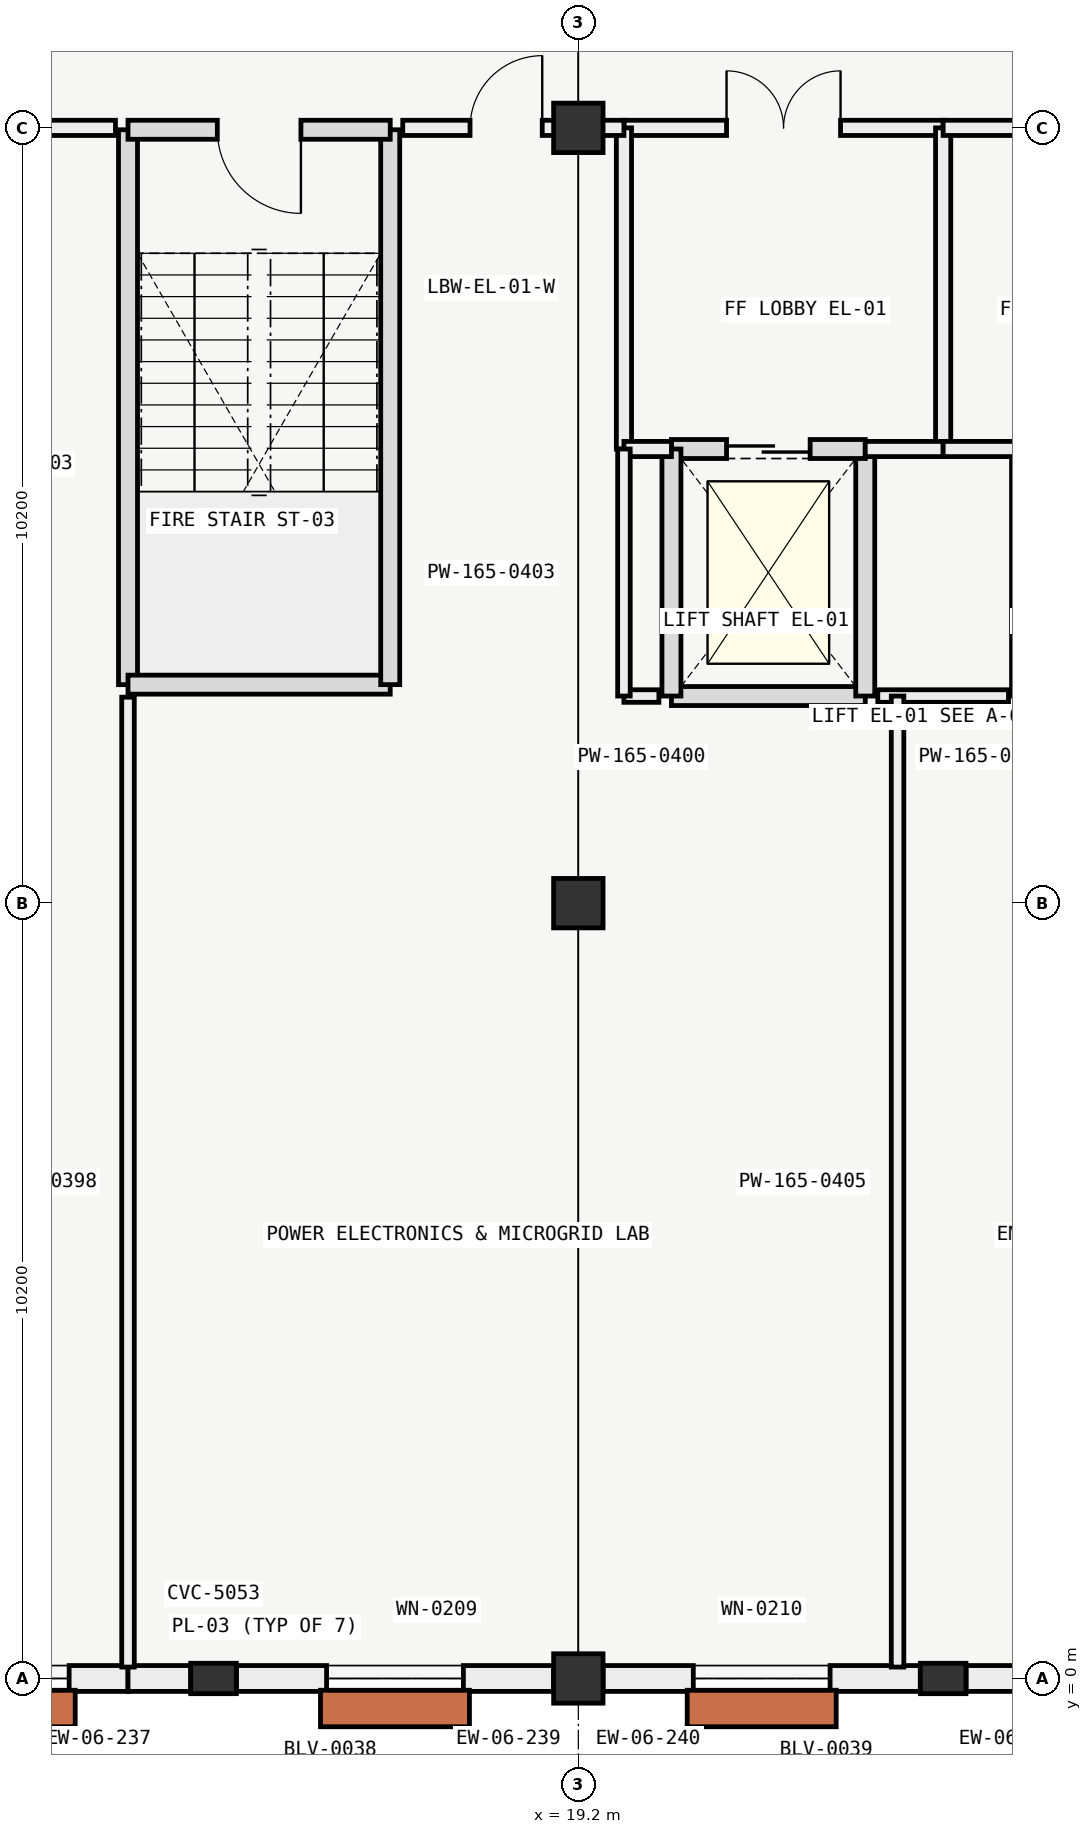
"""IFC4 building model, lengths in metres.
Left out: names, types, materials, properties, quantities, classifications, styles, units other than length and angle.
Written with IfcOpenShell. Run it as: python <this file> out.ifc"""

import sys

from ifc_helpers import new_model, si_unit, direction, frame, frame_2d, origin, origin_2d, place, context, subcontext, project, spatial, rectangle, extrude, element, fill, save


model = new_model("IFC4")
c1 = context("Model", 3, precision=1e-05, world=origin(), true_north=direction((0.0, 1.0)))
c2 = subcontext(c1, "Body", "Model", "MODEL_VIEW")
j1 = project(units=[si_unit("LENGTHUNIT", "METRE"), si_unit("PLANEANGLEUNIT", "RADIAN")], contexts=[c1])
p1 = place(None, origin())
s1 = spatial("IfcSite", under=j1, at=p1, CompositionType="ELEMENT")
p2 = place(p1, origin())
s2 = spatial("IfcBuilding", under=s1, at=p2, CompositionType="ELEMENT")
p3 = place(p2, frame((0.0, 0.0, 13.8)))
s3 = spatial("IfcBuildingStorey", under=s2, at=p3, CompositionType="ELEMENT", Elevation=13.8)
for number, where, z_axis, x_axis in (
    (1, (19.2, 0.0, 0.0), (0.0, 0.0, 1.0), (1.0, 0.0, 0.0)),
    (2, (19.2, 10.2, 0.0), (0.0, 0.0, 1.0), (1.0, 0.0, 0.0)),
    (3, (19.2, 20.4, 0.0), (0.0, 0.0, 1.0), (1.0, 0.0, 0.0)),
):
    element("IfcColumn", number, at=place(p3, frame(where, z_axis=z_axis, x_axis=x_axis)), inside=s3, PredefinedType="COLUMN", context=c2, shape_type="SweptSolid", body=[
        extrude(rectangle(XDim=0.65, YDim=0.65, at=origin_2d()), origin(), (0.0, 0.0, 1.0), 4.2),
    ])
for number, where, z_axis, x_axis in (
    (4, (14.4, 0.0, 0.0), (0.0, 0.0, 1.0), (0.0, 1.0, 0.0)),
    (5, (24.0, 0.0, 0.0), (0.0, 0.0, 1.0), (0.0, 1.0, 0.0)),
):
    element("IfcColumn", number, at=place(p3, frame(where, z_axis=z_axis, x_axis=x_axis)), inside=s3, PredefinedType="PILASTER", context=c2, shape_type="SweptSolid", body=[
        extrude(rectangle(XDim=0.4, YDim=0.6, at=origin_2d()), origin(), (0.0, 0.0, 1.0), 4.2),
    ])
p4 = place(p3, frame((13.275, 0.0, 0.0), z_axis=(0.0, 0.0, 1.0), x_axis=(-1.0, 0.0, 0.0)))
e6 = element("IfcWall", 6, at=p4, inside=s3, PredefinedType="SOLIDWALL", context=c2, shape_type="SweptSolid", body=[
    extrude(rectangle(XDim=3.349, YDim=0.34, at=frame_2d((1.674, 0.0))), origin(), (0.0, 0.0, 1.0), 3.28),
])
p5 = place(p4, frame((0.774, 0.0, 0.8)))
e7 = element("IfcOpeningElement", 7, at=p5, cuts=e6, PredefinedType="OPENING", context=c2, shape_type="SweptSolid", body=[
    extrude(rectangle(XDim=1.8, YDim=2.1, at=frame_2d((0.9, 1.05))), frame((0.0, 0.18, 0.0), z_axis=(0.0, -1.0, 0.0), x_axis=(1.0, 0.0, 0.0)), (0.0, 0.0, 1.0), 0.36),
])
p6 = place(p3, frame((14.099, 0.0, 0.0), z_axis=(0.0, 0.0, 1.0), x_axis=(-1.0, 0.0, 0.0)))
e8 = element("IfcWall", 8, at=p6, inside=s3, PredefinedType="SOLIDWALL", context=c2, shape_type="SweptSolid", body=[
    extrude(rectangle(XDim=0.824, YDim=0.34, at=frame_2d((0.412, 0.0))), origin(), (0.0, 0.0, 1.0), 3.28),
])
p7 = place(p3, frame((18.874, 0.0, 0.0), z_axis=(0.0, 0.0, 1.0), x_axis=(-1.0, 0.0, 0.0)))
e9 = element("IfcWall", 9, at=p7, inside=s3, PredefinedType="SOLIDWALL", context=c2, shape_type="SweptSolid", body=[
    extrude(rectangle(XDim=4.173, YDim=0.34, at=frame_2d((2.086, 0.0))), origin(), (0.0, 0.0, 1.0), 3.28),
])
p8 = place(p7, frame((1.187, 0.0, 0.8)))
e10 = element("IfcOpeningElement", 10, at=p8, cuts=e9, PredefinedType="OPENING", context=c2, shape_type="SweptSolid", body=[
    extrude(rectangle(XDim=1.8, YDim=2.1, at=frame_2d((0.9, 1.05))), frame((0.0, 0.18, 0.0), z_axis=(0.0, -1.0, 0.0), x_axis=(1.0, 0.0, 0.0)), (0.0, 0.0, 1.0), 0.36),
])
p9 = place(p3, frame((23.699, 0.0, 0.0), z_axis=(0.0, 0.0, 1.0), x_axis=(-1.0, 0.0, 0.0)))
e11 = element("IfcWall", 11, at=p9, inside=s3, PredefinedType="SOLIDWALL", context=c2, shape_type="SweptSolid", body=[
    extrude(rectangle(XDim=4.173, YDim=0.34, at=frame_2d((2.086, 0.0))), origin(), (0.0, 0.0, 1.0), 3.28),
])
p10 = place(p9, frame((1.187, 0.0, 0.8)))
e12 = element("IfcOpeningElement", 12, at=p10, cuts=e11, PredefinedType="OPENING", context=c2, shape_type="SweptSolid", body=[
    extrude(rectangle(XDim=1.8, YDim=2.1, at=frame_2d((0.9, 1.05))), frame((0.0, 0.18, 0.0), z_axis=(0.0, -1.0, 0.0), x_axis=(1.0, 0.0, 0.0)), (0.0, 0.0, 1.0), 0.36),
])
p11 = place(p3, frame((28.474, 0.0, 0.0), z_axis=(0.0, 0.0, 1.0), x_axis=(-1.0, 0.0, 0.0)))
e13 = element("IfcWall", 13, at=p11, inside=s3, PredefinedType="SOLIDWALL", context=c2, shape_type="SweptSolid", body=[
    extrude(rectangle(XDim=4.173, YDim=0.34, at=frame_2d((2.086, 0.0))), origin(), (0.0, 0.0, 1.0), 3.28),
])
p12 = place(p11, frame((1.187, 0.0, 0.8)))
e14 = element("IfcOpeningElement", 14, at=p12, cuts=e13, PredefinedType="OPENING", context=c2, shape_type="SweptSolid", body=[
    extrude(rectangle(XDim=1.8, YDim=2.1, at=frame_2d((0.9, 1.05))), frame((0.0, 0.18, 0.0), z_axis=(0.0, -1.0, 0.0), x_axis=(1.0, 0.0, 0.0)), (0.0, 0.0, 1.0), 0.36),
])
p13 = place(p3, frame((13.275, 20.375, 0.0), z_axis=(0.0, 0.0, 1.0), x_axis=(0.0, -1.0, 0.0)))
e15 = element("IfcWall", 15, at=p13, inside=s3, PredefinedType="SOLIDWALL", context=c2, shape_type="SweptSolid", body=[
    extrude(rectangle(XDim=7.3, YDim=0.25, at=frame_2d((3.65, 0.0))), origin(), (0.0, 0.0, 1.0), 3.95),
])
p14 = place(p3, frame((13.275, 13.075, 0.0), z_axis=(0.0, 0.0, 1.0), x_axis=(1.0, 0.0, 0.0)))
e16 = element("IfcWall", 16, at=p14, inside=s3, PredefinedType="SOLIDWALL", context=c2, shape_type="SweptSolid", body=[
    extrude(rectangle(XDim=3.45, YDim=0.25, at=frame_2d((1.725, 0.0))), origin(), (0.0, 0.0, 1.0), 3.95),
])
p15 = place(p3, frame((16.725, 13.075, 0.0), z_axis=(0.0, 0.0, 1.0), x_axis=(0.0, 1.0, 0.0)))
e17 = element("IfcWall", 17, at=p15, inside=s3, PredefinedType="SOLIDWALL", context=c2, shape_type="SweptSolid", body=[
    extrude(rectangle(XDim=7.3, YDim=0.25, at=frame_2d((3.65, 0.0))), origin(), (0.0, 0.0, 1.0), 3.95),
])
p16 = place(p3, frame((16.725, 20.375, 0.0), z_axis=(0.0, 0.0, 1.0), x_axis=(-1.0, 0.0, 0.0)))
e18 = element("IfcWall", 18, at=p16, inside=s3, PredefinedType="SOLIDWALL", context=c2, shape_type="SweptSolid", body=[
    extrude(rectangle(XDim=3.45, YDim=0.25, at=frame_2d((1.725, 0.0))), origin(), (0.0, 0.0, 1.0), 3.95),
])
p17 = place(p16, frame((1.175, 0.0, 0.0)))
e19 = element("IfcOpeningElement", 19, at=p17, cuts=e18, PredefinedType="OPENING", context=c2, shape_type="SweptSolid", body=[
    extrude(rectangle(XDim=1.1, YDim=2.2, at=frame_2d((0.55, 1.1))), frame((0.0, 0.135, 0.0), z_axis=(0.0, -1.0, 0.0), x_axis=(1.0, 0.0, 0.0)), (0.0, 0.0, 1.0), 0.27),
])
p18 = place(p3, frame((20.425, 12.925, 0.0), z_axis=(0.0, 0.0, 1.0), x_axis=(1.0, 0.0, 0.0)))
e20 = element("IfcWall", 20, at=p18, inside=s3, PredefinedType="SOLIDWALL", context=c2, shape_type="SweptSolid", body=[
    extrude(rectangle(XDim=2.55, YDim=0.25, at=frame_2d((1.275, 0.0))), origin(), (0.0, 0.0, 1.0), 3.95),
])
p19 = place(p3, frame((22.975, 12.925, 0.0), z_axis=(0.0, 0.0, 1.0), x_axis=(0.0, 1.0, 0.0)))
e21 = element("IfcWall", 21, at=p19, inside=s3, PredefinedType="SOLIDWALL", context=c2, shape_type="SweptSolid", body=[
    extrude(rectangle(XDim=3.25, YDim=0.25, at=frame_2d((1.625, 0.0))), origin(), (0.0, 0.0, 1.0), 3.95),
])
p20 = place(p3, frame((22.975, 16.175, 0.0), z_axis=(0.0, 0.0, 1.0), x_axis=(-1.0, 0.0, 0.0)))
e22 = element("IfcWall", 22, at=p20, inside=s3, PredefinedType="SOLIDWALL", context=c2, shape_type="SweptSolid", body=[
    extrude(rectangle(XDim=2.55, YDim=0.25, at=frame_2d((1.275, 0.0))), origin(), (0.0, 0.0, 1.0), 3.95),
])
p21 = place(p20, frame((0.725, 0.0, 0.0)))
e23 = element("IfcOpeningElement", 23, at=p21, cuts=e22, PredefinedType="OPENING", context=c2, shape_type="SweptSolid", body=[
    extrude(rectangle(XDim=1.1, YDim=2.1, at=frame_2d((0.55, 1.05))), frame((0.0, 0.135, 0.0), z_axis=(0.0, -1.0, 0.0), x_axis=(1.0, 0.0, 0.0)), (0.0, 0.0, 1.0), 0.27),
])
p22 = place(p3, frame((20.425, 16.175, 0.0), z_axis=(0.0, 0.0, 1.0), x_axis=(0.0, -1.0, 0.0)))
e24 = element("IfcWall", 24, at=p22, inside=s3, PredefinedType="SOLIDWALL", context=c2, shape_type="SweptSolid", body=[
    extrude(rectangle(XDim=3.25, YDim=0.25, at=frame_2d((1.625, 0.0))), origin(), (0.0, 0.0, 1.0), 3.95),
])
p23 = place(p3, frame((19.8, 20.4, 0.0), z_axis=(0.0, 0.0, 1.0), x_axis=(1.0, 0.0, 0.0)))
e25 = element("IfcWall", 25, at=p23, inside=s3, PredefinedType="PARTITIONING", context=c2, shape_type="SweptSolid", body=[
    extrude(rectangle(XDim=4.2, YDim=0.2, at=frame_2d((2.1, 0.0))), origin(), (0.0, 0.0, 1.0), 3.33),
])
p24 = place(p23, frame((1.35, 0.0, 0.0)))
e26 = element("IfcOpeningElement", 26, at=p24, cuts=e25, PredefinedType="OPENING", context=c2, shape_type="SweptSolid", body=[
    extrude(rectangle(XDim=1.5, YDim=2.2, at=frame_2d((0.75, 1.1))), frame((0.0, 0.11, 0.0), z_axis=(0.0, -1.0, 0.0), x_axis=(1.0, 0.0, 0.0)), (0.0, 0.0, 1.0), 0.22),
])
for number, where, z_axis, x_axis in (
    (27, (19.8, 16.175, 0.0), (0.0, 0.0, 1.0), (0.0, 1.0, 0.0)),
    (28, (24.0, 16.175, 0.0), (0.0, 0.0, 1.0), (0.0, 1.0, 0.0)),
):
    element("IfcWall", number, at=place(p3, frame(where, z_axis=z_axis, x_axis=x_axis)), inside=s3, PredefinedType="PARTITIONING", context=c2, shape_type="SweptSolid", body=[
        extrude(rectangle(XDim=4.225, YDim=0.2, at=frame_2d((2.112, 0.0))), origin(), (0.0, 0.0, 1.0), 3.33),
    ])
p25 = place(p3, frame((19.8, 16.175, 0.0), z_axis=(0.0, 0.0, 1.0), x_axis=(1.0, 0.0, 0.0)))
e29 = element("IfcWall", 29, at=p25, inside=s3, PredefinedType="PARTITIONING", context=c2, shape_type="SweptSolid", body=[
    extrude(rectangle(XDim=0.625, YDim=0.2, at=frame_2d((0.312, 0.0))), origin(), (0.0, 0.0, 1.0), 3.55),
])
p26 = place(p3, frame((22.975, 16.175, 0.0), z_axis=(0.0, 0.0, 1.0), x_axis=(1.0, 0.0, 0.0)))
e30 = element("IfcWall", 30, at=p26, inside=s3, PredefinedType="PARTITIONING", context=c2, shape_type="SweptSolid", body=[
    extrude(rectangle(XDim=1.025, YDim=0.2, at=frame_2d((0.512, 0.0))), origin(), (0.0, 0.0, 1.0), 3.55),
])
p27 = place(p3, frame((24.0, 20.4, 0.0), z_axis=(0.0, 0.0, 1.0), x_axis=(1.0, 0.0, 0.0)))
e31 = element("IfcWall", 31, at=p27, inside=s3, PredefinedType="PARTITIONING", context=c2, shape_type="SweptSolid", body=[
    extrude(rectangle(XDim=4.2, YDim=0.2, at=frame_2d((2.1, 0.0))), origin(), (0.0, 0.0, 1.0), 3.33),
])
p28 = place(p27, frame((1.35, 0.0, 0.0)))
e32 = element("IfcOpeningElement", 32, at=p28, cuts=e31, PredefinedType="OPENING", context=c2, shape_type="SweptSolid", body=[
    extrude(rectangle(XDim=1.5, YDim=2.2, at=frame_2d((0.75, 1.1))), frame((0.0, 0.11, 0.0), z_axis=(0.0, -1.0, 0.0), x_axis=(1.0, 0.0, 0.0)), (0.0, 0.0, 1.0), 0.22),
])
p29 = place(p3, frame((24.0, 16.175, 0.0), z_axis=(0.0, 0.0, 1.0), x_axis=(1.0, 0.0, 0.0)))
e33 = element("IfcWall", 33, at=p29, inside=s3, PredefinedType="PARTITIONING", context=c2, shape_type="SweptSolid", body=[
    extrude(rectangle(XDim=1.025, YDim=0.2, at=frame_2d((0.512, 0.0))), origin(), (0.0, 0.0, 1.0), 3.55),
])
p30 = place(p3, frame((13.275, 0.15, 0.0), z_axis=(0.0, 0.0, 1.0), x_axis=(0.0, 1.0, 0.0)))
e34 = element("IfcWall", 34, at=p30, inside=s3, PredefinedType="PARTITIONING", context=c2, shape_type="SweptSolid", body=[
    extrude(rectangle(XDim=12.76, YDim=0.165, at=frame_2d((6.38, 0.0))), origin(), (0.0, 0.0, 1.0), 3.33),
])
p31 = place(p3, frame((0.15, 20.4, 0.0), z_axis=(0.0, 0.0, 1.0), x_axis=(1.0, 0.0, 0.0)))
e35 = element("IfcWall", 35, at=p31, inside=s3, PredefinedType="PARTITIONING", context=c2, shape_type="SweptSolid", body=[
    extrude(rectangle(XDim=12.96, YDim=0.2, at=frame_2d((6.48, 0.0))), origin(), (0.0, 0.0, 1.0), 3.28),
])
p32 = place(p31, frame((6.05, 0.0, 0.0)))
e36 = element("IfcOpeningElement", 36, at=p32, cuts=e35, PredefinedType="OPENING", context=c2, shape_type="SweptSolid", body=[
    extrude(rectangle(XDim=1.4, YDim=2.2, at=frame_2d((0.7, 1.1))), frame((0.0, 0.11, 0.0), z_axis=(0.0, -1.0, 0.0), x_axis=(1.0, 0.0, 0.0)), (0.0, 0.0, 1.0), 0.22),
])
p33 = place(p3, frame((19.8, 12.925, 0.0), z_axis=(0.0, 0.0, 1.0), x_axis=(1.0, 0.0, 0.0)))
e37 = element("IfcWall", 37, at=p33, inside=s3, PredefinedType="PARTITIONING", context=c2, shape_type="SweptSolid", body=[
    extrude(rectangle(XDim=0.46, YDim=0.165, at=frame_2d((0.23, 0.0))), origin(), (0.0, 0.0, 1.0), 3.85),
])
p34 = place(p3, frame((23.14, 12.925, 0.0), z_axis=(0.0, 0.0, 1.0), x_axis=(1.0, 0.0, 0.0)))
e38 = element("IfcWall", 38, at=p34, inside=s3, PredefinedType="PARTITIONING", context=c2, shape_type="SweptSolid", body=[
    extrude(rectangle(XDim=1.72, YDim=0.165, at=frame_2d((0.86, 0.0))), origin(), (0.0, 0.0, 1.0), 3.85),
])
p35 = place(p3, frame((19.8, 12.925, 0.0), z_axis=(0.0, 0.0, 1.0), x_axis=(0.0, 1.0, 0.0)))
e39 = element("IfcWall", 39, at=p35, inside=s3, PredefinedType="PARTITIONING", context=c2, shape_type="SweptSolid", body=[
    extrude(rectangle(XDim=3.25, YDim=0.165, at=frame_2d((1.625, 0.0))), origin(), (0.0, 0.0, 1.0), 3.85),
])
p36 = place(p3, frame((16.89, 20.4, 0.0), z_axis=(0.0, 0.0, 1.0), x_axis=(1.0, 0.0, 0.0)))
e40 = element("IfcWall", 40, at=p36, inside=s3, PredefinedType="PARTITIONING", context=c2, shape_type="SweptSolid", body=[
    extrude(rectangle(XDim=2.91, YDim=0.2, at=frame_2d((1.455, 0.0))), origin(), (0.0, 0.0, 1.0), 3.28),
])
p37 = place(p36, frame((0.885, 0.0, 0.0)))
e41 = element("IfcOpeningElement", 41, at=p37, cuts=e40, PredefinedType="OPENING", context=c2, shape_type="SweptSolid", body=[
    extrude(rectangle(XDim=0.95, YDim=2.1, at=frame_2d((0.475, 1.05))), frame((0.0, 0.11, 0.0), z_axis=(0.0, -1.0, 0.0), x_axis=(1.0, 0.0, 0.0)), (0.0, 0.0, 1.0), 0.22),
])
p38 = place(p3, frame((23.4, 0.15, 0.0), z_axis=(0.0, 0.0, 1.0), x_axis=(0.0, 1.0, 0.0)))
e42 = element("IfcWall", 42, at=p38, inside=s3, PredefinedType="PARTITIONING", context=c2, shape_type="SweptSolid", body=[
    extrude(rectangle(XDim=12.775, YDim=0.165, at=frame_2d((6.388, 0.0))), origin(), (0.0, 0.0, 1.0), 3.33),
])
p39 = place(p5, origin())
e43 = element("IfcWindow", 43, at=p39, inside=s3, PartitioningType="SINGLE_PANEL", PredefinedType="WINDOW", context=c2, shape_type="SweptSolid", body=[
    extrude(rectangle(XDim=1.8, YDim=2.1, at=frame_2d((0.9, 1.05))), frame((0.0, 0.03, 0.0), z_axis=(0.0, -1.0, 0.0), x_axis=(1.0, 0.0, 0.0)), (0.0, 0.0, 1.0), 0.06),
])
fill(e7, e43)
p40 = place(p8, origin())
e44 = element("IfcWindow", 44, at=p40, inside=s3, PartitioningType="SINGLE_PANEL", PredefinedType="WINDOW", context=c2, shape_type="SweptSolid", body=[
    extrude(rectangle(XDim=1.8, YDim=2.1, at=frame_2d((0.9, 1.05))), frame((0.0, 0.03, 0.0), z_axis=(0.0, -1.0, 0.0), x_axis=(1.0, 0.0, 0.0)), (0.0, 0.0, 1.0), 0.06),
])
fill(e10, e44)
p41 = place(p10, origin())
e45 = element("IfcWindow", 45, at=p41, inside=s3, PartitioningType="SINGLE_PANEL", PredefinedType="WINDOW", context=c2, shape_type="SweptSolid", body=[
    extrude(rectangle(XDim=1.8, YDim=2.1, at=frame_2d((0.9, 1.05))), frame((0.0, 0.03, 0.0), z_axis=(0.0, -1.0, 0.0), x_axis=(1.0, 0.0, 0.0)), (0.0, 0.0, 1.0), 0.06),
])
fill(e12, e45)
p42 = place(p17, origin())
e46 = element("IfcDoor", 46, at=p42, inside=s3, OperationType="SINGLE_SWING_LEFT", PredefinedType="DOOR", context=c2, shape_type="SweptSolid", body=[
    extrude(rectangle(XDim=1.1, YDim=2.2, at=frame_2d((0.55, 1.1))), frame((0.0, 0.025, 0.0), z_axis=(0.0, -1.0, 0.0), x_axis=(1.0, 0.0, 0.0)), (0.0, 0.0, 1.0), 0.05),
])
fill(e19, e46)
p43 = place(p21, origin())
e47 = element("IfcDoor", 47, at=p43, inside=s3, OperationType="SLIDING_TO_LEFT", PredefinedType="DOOR", context=c2, shape_type="SweptSolid", body=[
    extrude(rectangle(XDim=1.1, YDim=2.1, at=frame_2d((0.55, 1.05))), frame((0.0, 0.025, 0.0), z_axis=(0.0, -1.0, 0.0), x_axis=(1.0, 0.0, 0.0)), (0.0, 0.0, 1.0), 0.05),
])
fill(e23, e47)
p44 = place(p24, origin())
e48 = element("IfcDoor", 48, at=p44, inside=s3, OperationType="SINGLE_SWING_LEFT", PredefinedType="DOOR", context=c2, shape_type="SweptSolid", body=[
    extrude(rectangle(XDim=1.5, YDim=2.2, at=frame_2d((0.75, 1.1))), frame((0.0, 0.025, 0.0), z_axis=(0.0, -1.0, 0.0), x_axis=(1.0, 0.0, 0.0)), (0.0, 0.0, 1.0), 0.05),
])
fill(e26, e48)
p45 = place(p37, origin())
e49 = element("IfcDoor", 49, at=p45, inside=s3, OperationType="SINGLE_SWING_RIGHT", PredefinedType="DOOR", context=c2, shape_type="SweptSolid", body=[
    extrude(rectangle(XDim=0.95, YDim=2.1, at=frame_2d((0.475, 1.05))), frame((0.0, 0.025, 0.0), z_axis=(0.0, -1.0, 0.0), x_axis=(1.0, 0.0, 0.0)), (0.0, 0.0, 1.0), 0.05),
])
fill(e41, e49)
save(model, sys.argv[1])
